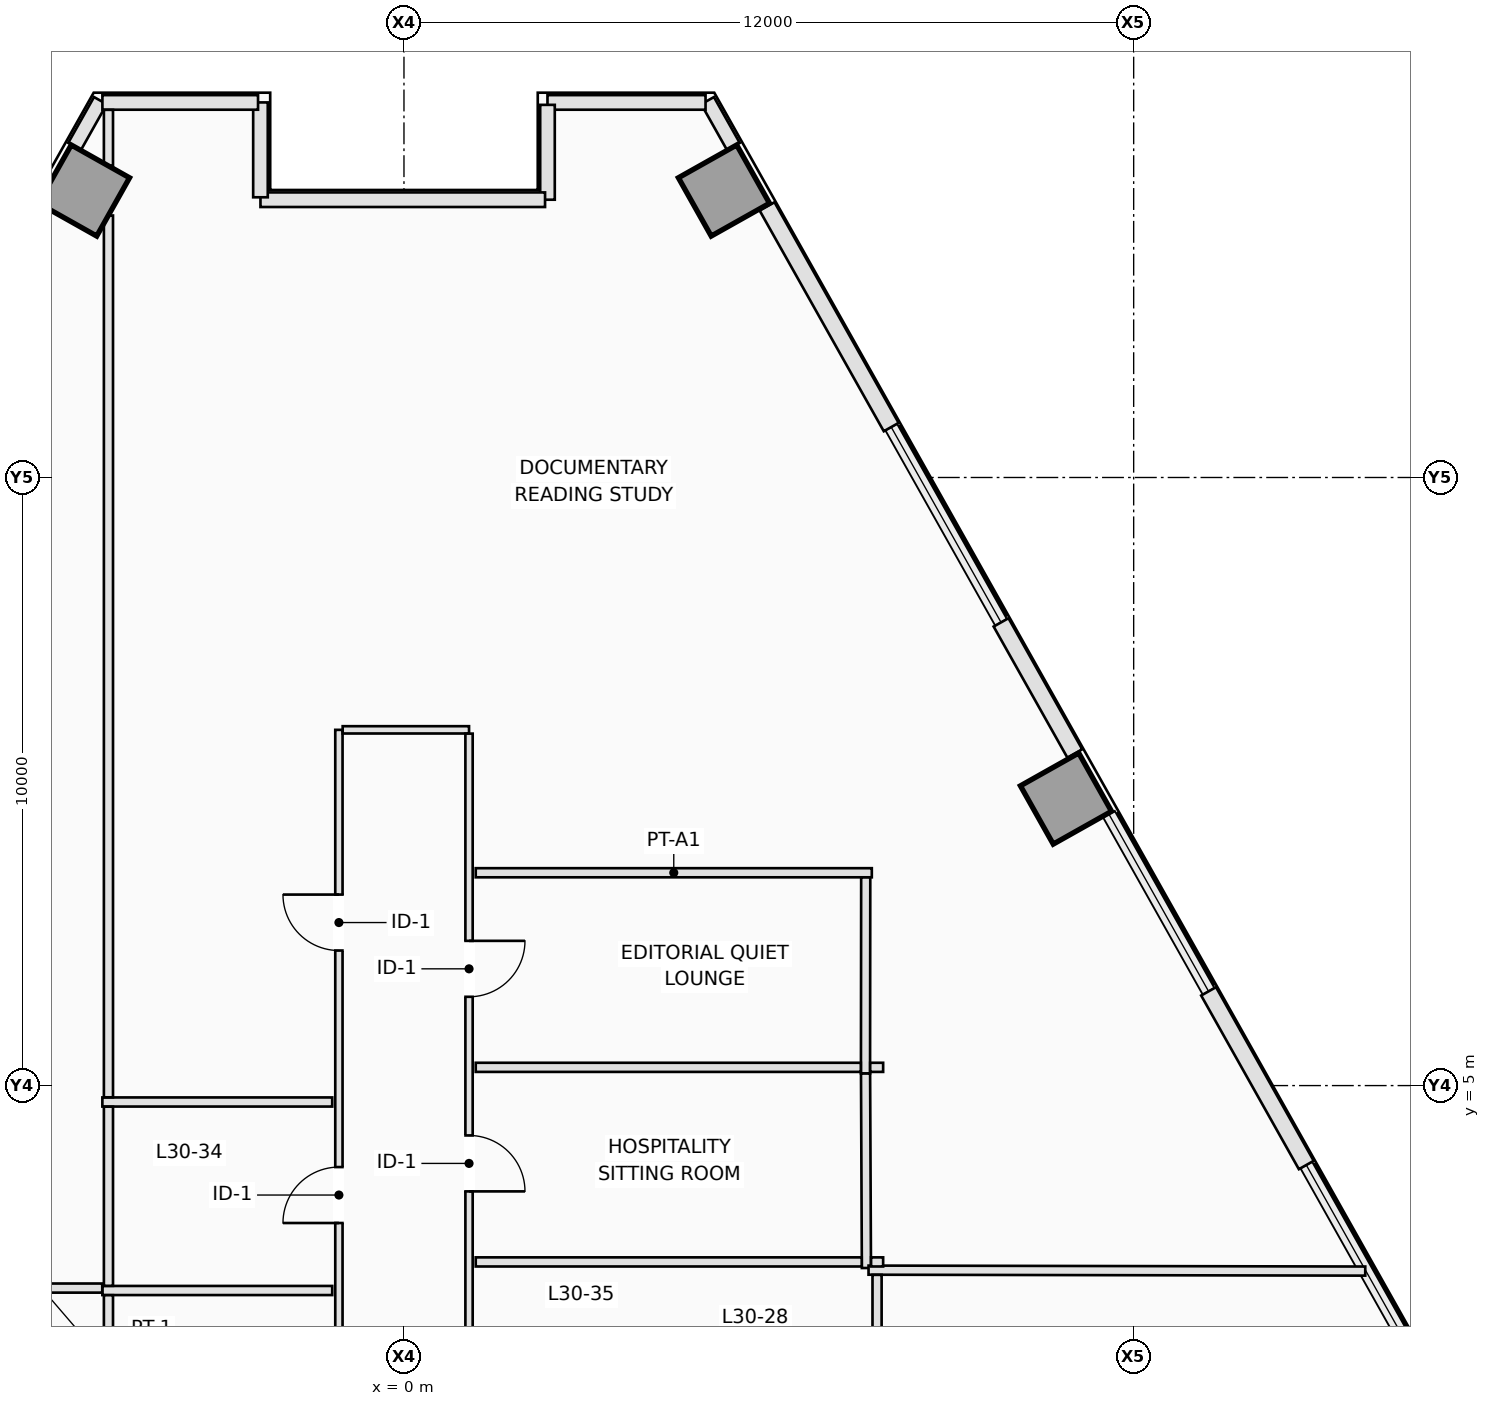
"""IFC4 building model, lengths in metres.
Left out: names, types, materials, properties, quantities, classifications, styles, units other than length and angle.
Written with IfcOpenShell. Run it as: python <this file> out.ifc"""

import sys

from ifc_helpers import new_model, si_unit, direction, frame, frame_2d, origin, origin_2d, place, context, subcontext, project, spatial, rectangle, extrude, element, fill, save


model = new_model("IFC4")
c1 = context("Model", 3, precision=1e-05, world=origin(), true_north=direction((0.0, 1.0)))
c2 = subcontext(c1, "Body", "Model", "MODEL_VIEW")
j1 = project(units=[si_unit("LENGTHUNIT", "METRE"), si_unit("PLANEANGLEUNIT", "RADIAN")], contexts=[c1])
p1 = place(None, origin())
s1 = spatial("IfcSite", under=j1, at=p1, CompositionType="ELEMENT")
p2 = place(p1, origin())
s2 = spatial("IfcBuilding", under=s1, at=p2, CompositionType="ELEMENT")
p3 = place(p2, frame((0.0, 0.0, 112.5)))
s3 = spatial("IfcBuildingStorey", under=s2, at=p3, CompositionType="ELEMENT", Elevation=112.5)
for number, where, z_axis, x_axis in (
    (1, (10.887, 9.72, 0.0), (0.0, 0.0, 1.0), (0.872, 0.49, 0.0)),
    (2, (5.262, 19.719, 0.0), (0.0, 0.0, 1.0), (0.872, 0.49, 0.0)),
    (3, (-5.262, 19.719, 0.0), (0.0, 0.0, 1.0), (-0.872, 0.49, 0.0)),
):
    element("IfcColumn", number, at=place(p3, frame(where, z_axis=z_axis, x_axis=x_axis)), inside=s3, PredefinedType="COLUMN", context=c2, shape_type="SweptSolid", body=[
        extrude(rectangle(XDim=1.1, YDim=1.1, at=origin_2d()), origin(), (0.0, 0.0, 1.0), 3.5),
    ])
p4 = place(p3, frame((4.993, 21.197, 0.0), z_axis=(0.0, 0.0, 1.0), x_axis=(0.490355003566, -0.871522788272, 0.0)))
e4 = element("IfcWall", 4, at=p4, inside=s3, PredefinedType="STANDARD", context=c2, shape_type="SweptSolid", body=[
    extrude(rectangle(XDim=0.865, YDim=0.24, at=frame_2d((0.433, 0.0))), origin(), (0.0, 0.0, 1.0), 3.25),
])
p5 = place(p3, frame((5.971, 19.458, 0.0), z_axis=(0.0, 0.0, 1.0), x_axis=(0.490280725514, -0.87156457603, 0.0)))
e5 = element("IfcWall", 5, at=p5, inside=s3, PredefinedType="STANDARD", context=c2, shape_type="SweptSolid", body=[
    extrude(rectangle(XDim=4.164, YDim=0.28, at=frame_2d((2.082, 0.0))), origin(), (0.0, 0.0, 1.0), 3.25),
])
p6 = place(p3, frame((9.819, 12.617, 0.0), z_axis=(0.0, 0.0, 1.0), x_axis=(0.490303410255, -0.871551814807, 0.0)))
e6 = element("IfcWall", 6, at=p6, inside=s3, PredefinedType="STANDARD", context=c2, shape_type="SweptSolid", body=[
    extrude(rectangle(XDim=2.474, YDim=0.28, at=frame_2d((1.237, 0.0))), origin(), (0.0, 0.0, 1.0), 3.25),
])
p7 = place(p3, frame((13.232, 6.55, 0.0), z_axis=(0.0, 0.0, 1.0), x_axis=(0.490310760781, -0.871547679626, 0.0)))
e7 = element("IfcWall", 7, at=p7, inside=s3, PredefinedType="STANDARD", context=c2, shape_type="SweptSolid", body=[
    extrude(rectangle(XDim=3.277, YDim=0.28, at=frame_2d((1.638, 0.0))), origin(), (0.0, 0.0, 1.0), 3.25),
])
p8 = place(p3, frame((-5.417, 20.443, 0.0), z_axis=(0.0, 0.0, 1.0), x_axis=(0.490355003566, 0.871522788272, 0.0)))
e8 = element("IfcWall", 8, at=p8, inside=s3, PredefinedType="STANDARD", context=c2, shape_type="SweptSolid", body=[
    extrude(rectangle(XDim=0.865, YDim=0.24, at=frame_2d((0.433, 0.0))), origin(), (0.0, 0.0, 1.0), 3.25),
])
p9 = place(p3, frame((4.959, 21.168, 0.0), z_axis=(0.0, 0.0, 1.0), x_axis=(-1.0, 0.0, 0.0)))
e9 = element("IfcWall", 9, at=p9, inside=s3, PredefinedType="STANDARD", context=c2, shape_type="SweptSolid", body=[
    extrude(rectangle(XDim=2.599, YDim=0.24, at=frame_2d((1.3, 0.0))), origin(), (0.0, 0.0, 1.0), 3.25),
])
p10 = place(p3, frame((2.36, 21.128, 0.0), z_axis=(0.0, 0.0, 1.0), x_axis=(0.0, -1.0, 0.0)))
e10 = element("IfcWall", 10, at=p10, inside=s3, PredefinedType="STANDARD", context=c2, shape_type="SweptSolid", body=[
    extrude(rectangle(XDim=1.56, YDim=0.24, at=frame_2d((0.78, 0.0))), origin(), (0.0, 0.0, 1.0), 3.25),
])
p11 = place(p3, frame((2.32, 19.568, 0.0), z_axis=(0.0, 0.0, 1.0), x_axis=(-1.0, 0.0, 0.0)))
e11 = element("IfcWall", 11, at=p11, inside=s3, PredefinedType="STANDARD", context=c2, shape_type="SweptSolid", body=[
    extrude(rectangle(XDim=4.68, YDim=0.24, at=frame_2d((2.34, 0.0))), origin(), (0.0, 0.0, 1.0), 2.722),
])
p12 = place(p3, frame((-2.36, 19.608, 0.0), z_axis=(0.0, 0.0, 1.0), x_axis=(0.0, 1.0, 0.0)))
e12 = element("IfcWall", 12, at=p12, inside=s3, PredefinedType="STANDARD", context=c2, shape_type="SweptSolid", body=[
    extrude(rectangle(XDim=1.56, YDim=0.24, at=frame_2d((0.78, 0.0))), origin(), (0.0, 0.0, 1.0), 3.25),
])
p13 = place(p3, frame((-2.4, 21.168, 0.0), z_axis=(0.0, 0.0, 1.0), x_axis=(-1.0, 0.0, 0.0)))
e13 = element("IfcWall", 13, at=p13, inside=s3, PredefinedType="STANDARD", context=c2, shape_type="SweptSolid", body=[
    extrude(rectangle(XDim=2.56, YDim=0.24, at=frame_2d((1.28, 0.0))), origin(), (0.0, 0.0, 1.0), 3.25),
])
p14 = place(p3, frame((-1.07, -2.338, 0.0), z_axis=(0.0, 0.0, 1.0), x_axis=(0.0, 1.0, 0.0)))
e14 = element("IfcWall", 14, at=p14, inside=s3, PredefinedType="PARTITIONING", context=c2, shape_type="SweptSolid", body=[
    extrude(rectangle(XDim=13.188, YDim=0.12, at=frame_2d((6.594, 0.0))), origin(), (0.0, 0.0, 1.0), 3.25),
])
p15 = place(p14, frame((9.559, 0.0, 0.0)))
e15 = element("IfcOpeningElement", 15, at=p15, cuts=e14, PredefinedType="OPENING", context=c2, shape_type="SweptSolid", body=[
    extrude(rectangle(XDim=0.92, YDim=2.12, at=frame_2d((0.46, 1.06))), frame((0.0, 0.07, 0.0), z_axis=(0.0, -1.0, 0.0), x_axis=(1.0, 0.0, 0.0)), (0.0, 0.0, 1.0), 0.14),
])
p16 = place(p14, frame((5.078, 0.0, 0.0)))
e16 = element("IfcOpeningElement", 16, at=p16, cuts=e14, PredefinedType="OPENING", context=c2, shape_type="SweptSolid", body=[
    extrude(rectangle(XDim=0.92, YDim=2.12, at=frame_2d((0.46, 1.06))), frame((0.0, 0.07, 0.0), z_axis=(0.0, -1.0, 0.0), x_axis=(1.0, 0.0, 0.0)), (0.0, 0.0, 1.0), 0.14),
])
p17 = place(p14, frame((1.622, 0.0, 0.0)))
e17 = element("IfcOpeningElement", 17, at=p17, cuts=e14, PredefinedType="OPENING", context=c2, shape_type="SweptSolid", body=[
    extrude(rectangle(XDim=0.92, YDim=2.12, at=frame_2d((0.46, 1.06))), frame((0.0, 0.07, 0.0), z_axis=(0.0, -1.0, 0.0), x_axis=(1.0, 0.0, 0.0)), (0.0, 0.0, 1.0), 0.14),
])
p18 = place(p3, frame((-1.008, 10.85, 0.0), z_axis=(0.0, 0.0, 1.0), x_axis=(1.0, 0.0, 0.0)))
e18 = element("IfcWall", 18, at=p18, inside=s3, PredefinedType="PARTITIONING", context=c2, shape_type="SweptSolid", body=[
    extrude(rectangle(XDim=2.078, YDim=0.12, at=frame_2d((1.039, 0.0))), origin(), (0.0, 0.0, 1.0), 3.25),
])
p19 = place(p3, frame((1.07, 10.788, 0.0), z_axis=(0.0, 0.0, 1.0), x_axis=(0.0, -1.0, 0.0)))
e19 = element("IfcWall", 19, at=p19, inside=s3, PredefinedType="PARTITIONING", context=c2, shape_type="SweptSolid", body=[
    extrude(rectangle(XDim=13.188, YDim=0.12, at=frame_2d((6.594, 0.0))), origin(), (0.0, 0.0, 1.0), 3.25),
])
p20 = place(p19, frame((3.408, 0.0, 0.0)))
e20 = element("IfcOpeningElement", 20, at=p20, cuts=e19, PredefinedType="OPENING", context=c2, shape_type="SweptSolid", body=[
    extrude(rectangle(XDim=0.92, YDim=2.12, at=frame_2d((0.46, 1.06))), frame((0.0, 0.07, 0.0), z_axis=(0.0, -1.0, 0.0), x_axis=(1.0, 0.0, 0.0)), (0.0, 0.0, 1.0), 0.14),
])
p21 = place(p19, frame((6.608, 0.0, 0.0)))
e21 = element("IfcOpeningElement", 21, at=p21, cuts=e19, PredefinedType="OPENING", context=c2, shape_type="SweptSolid", body=[
    extrude(rectangle(XDim=0.92, YDim=2.12, at=frame_2d((0.46, 1.06))), frame((0.0, 0.07, 0.0), z_axis=(0.0, -1.0, 0.0), x_axis=(1.0, 0.0, 0.0)), (0.0, 0.0, 1.0), 0.14),
])
p22 = place(p19, frame((10.349, 0.0, 0.0)))
e22 = element("IfcOpeningElement", 22, at=p22, cuts=e19, PredefinedType="OPENING", context=c2, shape_type="SweptSolid", body=[
    extrude(rectangle(XDim=0.92, YDim=2.12, at=frame_2d((0.46, 1.06))), frame((0.0, 0.07, 0.0), z_axis=(0.0, -1.0, 0.0), x_axis=(1.0, 0.0, 0.0)), (0.0, 0.0, 1.0), 0.14),
])
p23 = place(p3, frame((7.694, 8.5, 0.0), z_axis=(0.0, 0.0, 1.0), x_axis=(-1.0, 0.0, 0.0)))
e23 = element("IfcWall", 23, at=p23, inside=s3, PredefinedType="PARTITIONING", context=c2, shape_type="SweptSolid", body=[
    extrude(rectangle(XDim=6.514, YDim=0.15, at=frame_2d((3.257, 0.0))), origin(), (0.0, 0.0, 1.0), 3.25),
])
p24 = place(p3, frame((7.59, 5.2, 0.0), z_axis=(0.0, 0.0, 1.0), x_axis=(0.001136190753, 0.999999354535, 0.0)))
e24 = element("IfcWall", 24, at=p24, inside=s3, PredefinedType="PARTITIONING", context=c2, shape_type="SweptSolid", body=[
    extrude(rectangle(XDim=3.223, YDim=0.15, at=frame_2d((1.612, 0.0))), origin(), (0.0, 0.0, 1.0), 3.25),
])
p25 = place(p3, frame((7.605, 2.0, 0.0), z_axis=(0.0, 0.0, 1.0), x_axis=(-0.004427775513, 0.999990197354, 0.0)))
e25 = element("IfcWall", 25, at=p25, inside=s3, PredefinedType="PARTITIONING", context=c2, shape_type="SweptSolid", body=[
    extrude(rectangle(XDim=3.198, YDim=0.15, at=frame_2d((1.599, 0.0))), origin(), (0.0, 0.0, 1.0), 3.25),
])
p26 = place(p3, frame((-1.18, 4.73, 0.0), z_axis=(0.0, 0.0, 1.0), x_axis=(-1.0, 0.0, 0.0)))
e26 = element("IfcWall", 26, at=p26, inside=s3, PredefinedType="PARTITIONING", context=c2, shape_type="SweptSolid", body=[
    extrude(rectangle(XDim=3.78, YDim=0.15, at=frame_2d((1.89, 0.0))), origin(), (0.0, 0.0, 1.0), 3.25),
])
p27 = place(p3, frame((-4.86, 4.807, 0.0), z_axis=(0.0, 0.0, 1.0), x_axis=(0.0, 1.0, 0.0)))
e27 = element("IfcWall", 27, at=p27, inside=s3, PredefinedType="PARTITIONING", context=c2, shape_type="SweptSolid", body=[
    extrude(rectangle(XDim=14.501, YDim=0.15, at=frame_2d((7.251, 0.0))), origin(), (0.0, 0.0, 1.0), 2.648),
])
p28 = place(p3, frame((-4.86, 20.126, 0.0), z_axis=(0.0, 0.0, 1.0), x_axis=(0.0, 1.0, 0.0)))
e28 = element("IfcWall", 28, at=p28, inside=s3, PredefinedType="PARTITIONING", context=c2, shape_type="SweptSolid", body=[
    extrude(rectangle(XDim=0.92, YDim=0.15, at=frame_2d((0.46, 0.0))), origin(), (0.0, 0.0, 1.0), 3.25),
])
p29 = place(p3, frame((15.808, 1.949, 0.0), z_axis=(0.0, 0.0, 1.0), x_axis=(-0.999998283071, 0.001853066338, 0.0)))
e29 = element("IfcWall", 29, at=p29, inside=s3, PredefinedType="PARTITIONING", context=c2, shape_type="SweptSolid", body=[
    extrude(rectangle(XDim=8.168, YDim=0.15, at=frame_2d((4.084, 0.0))), origin(), (0.0, 0.0, 1.0), 3.25),
])
p30 = place(p3, frame((7.88, 5.3, 0.0), z_axis=(0.0, 0.0, 1.0), x_axis=(-1.0, 0.0, 0.0)))
e30 = element("IfcWall", 30, at=p30, inside=s3, PredefinedType="PARTITIONING", context=c2, shape_type="SweptSolid", body=[
    extrude(rectangle(XDim=0.213, YDim=0.15, at=frame_2d((0.106, 0.0))), origin(), (0.0, 0.0, 1.0), 3.25),
])
p31 = place(p3, frame((7.513, 5.3, 0.0), z_axis=(0.0, 0.0, 1.0), x_axis=(-1.0, 0.0, 0.0)))
e31 = element("IfcWall", 31, at=p31, inside=s3, PredefinedType="PARTITIONING", context=c2, shape_type="SweptSolid", body=[
    extrude(rectangle(XDim=6.333, YDim=0.15, at=frame_2d((3.167, 0.0))), origin(), (0.0, 0.0, 1.0), 3.25),
])
p32 = place(p3, frame((7.88, 2.1, 0.0), z_axis=(0.0, 0.0, 1.0), x_axis=(-1.0, 0.0, 0.0)))
e32 = element("IfcWall", 32, at=p32, inside=s3, PredefinedType="PARTITIONING", context=c2, shape_type="SweptSolid", body=[
    extrude(rectangle(XDim=0.198, YDim=0.15, at=frame_2d((0.099, 0.0))), origin(), (0.0, 0.0, 1.0), 3.25),
])
p33 = place(p3, frame((7.528, 2.1, 0.0), z_axis=(0.0, 0.0, 1.0), x_axis=(-1.0, 0.0, 0.0)))
e33 = element("IfcWall", 33, at=p33, inside=s3, PredefinedType="PARTITIONING", context=c2, shape_type="SweptSolid", body=[
    extrude(rectangle(XDim=6.348, YDim=0.15, at=frame_2d((3.174, 0.0))), origin(), (0.0, 0.0, 1.0), 3.25),
])
p34 = place(p3, frame((-1.18, 1.63, 0.0), z_axis=(0.0, 0.0, 1.0), x_axis=(-1.0, 0.0, 0.0)))
e34 = element("IfcWall", 34, at=p34, inside=s3, PredefinedType="PARTITIONING", context=c2, shape_type="SweptSolid", body=[
    extrude(rectangle(XDim=3.78, YDim=0.15, at=frame_2d((1.89, 0.0))), origin(), (0.0, 0.0, 1.0), 3.25),
])
p35 = place(p3, frame((-4.86, 0.372, 0.0), z_axis=(0.0, 0.0, 1.0), x_axis=(0.0, 1.0, 0.0)))
e35 = element("IfcWall", 35, at=p35, inside=s3, PredefinedType="PARTITIONING", context=c2, shape_type="SweptSolid", body=[
    extrude(rectangle(XDim=1.181, YDim=0.15, at=frame_2d((0.59, 0.0))), origin(), (0.0, 0.0, 1.0), 3.25),
])
p36 = place(p3, frame((-4.86, 1.707, 0.0), z_axis=(0.0, 0.0, 1.0), x_axis=(0.0, 1.0, 0.0)))
e36 = element("IfcWall", 36, at=p36, inside=s3, PredefinedType="PARTITIONING", context=c2, shape_type="SweptSolid", body=[
    extrude(rectangle(XDim=2.946, YDim=0.15, at=frame_2d((1.473, 0.0))), origin(), (0.0, 0.0, 1.0), 3.25),
])
p37 = place(p3, frame((7.78, 1.887, 0.0), z_axis=(0.0, 0.0, 1.0), x_axis=(0.0, -1.0, 0.0)))
e37 = element("IfcWall", 37, at=p37, inside=s3, PredefinedType="PARTITIONING", context=c2, shape_type="SweptSolid", body=[
    extrude(rectangle(XDim=4.177, YDim=0.15, at=frame_2d((2.089, 0.0))), origin(), (0.0, 0.0, 1.0), 3.25),
])
p38 = place(p3, frame((-10.983, 1.67, 0.0), z_axis=(0.0, 0.0, 1.0), x_axis=(1.0, 0.0, 0.0)))
e38 = element("IfcWall", 38, at=p38, inside=s3, PredefinedType="PARTITIONING", context=c2, shape_type="SweptSolid", body=[
    extrude(rectangle(XDim=6.021, YDim=0.15, at=frame_2d((3.01, 0.0))), origin(), (0.0, 0.0, 1.0), 3.25),
])
p39 = place(p15, origin())
e39 = element("IfcDoor", 39, at=p39, inside=s3, OperationType="SINGLE_SWING_RIGHT", PredefinedType="DOOR", context=c2, shape_type="SweptSolid", body=[
    extrude(rectangle(XDim=0.92, YDim=2.12, at=frame_2d((0.46, 1.06))), frame((0.0, 0.025, 0.0), z_axis=(0.0, -1.0, 0.0), x_axis=(1.0, 0.0, 0.0)), (0.0, 0.0, 1.0), 0.05),
])
fill(e15, e39)
p40 = place(p20, origin())
e40 = element("IfcDoor", 40, at=p40, inside=s3, OperationType="SINGLE_SWING_LEFT", PredefinedType="DOOR", context=c2, shape_type="SweptSolid", body=[
    extrude(rectangle(XDim=0.92, YDim=2.12, at=frame_2d((0.46, 1.06))), frame((0.0, 0.025, 0.0), z_axis=(0.0, -1.0, 0.0), x_axis=(1.0, 0.0, 0.0)), (0.0, 0.0, 1.0), 0.05),
])
fill(e20, e40)
p41 = place(p21, origin())
e41 = element("IfcDoor", 41, at=p41, inside=s3, OperationType="SINGLE_SWING_RIGHT", PredefinedType="DOOR", context=c2, shape_type="SweptSolid", body=[
    extrude(rectangle(XDim=0.92, YDim=2.12, at=frame_2d((0.46, 1.06))), frame((0.0, 0.025, 0.0), z_axis=(0.0, -1.0, 0.0), x_axis=(1.0, 0.0, 0.0)), (0.0, 0.0, 1.0), 0.05),
])
fill(e21, e41)
p42 = place(p16, origin())
e42 = element("IfcDoor", 42, at=p42, inside=s3, OperationType="SINGLE_SWING_LEFT", PredefinedType="DOOR", context=c2, shape_type="SweptSolid", body=[
    extrude(rectangle(XDim=0.92, YDim=2.12, at=frame_2d((0.46, 1.06))), frame((0.0, 0.025, 0.0), z_axis=(0.0, -1.0, 0.0), x_axis=(1.0, 0.0, 0.0)), (0.0, 0.0, 1.0), 0.05),
])
fill(e16, e42)
save(model, sys.argv[1])
